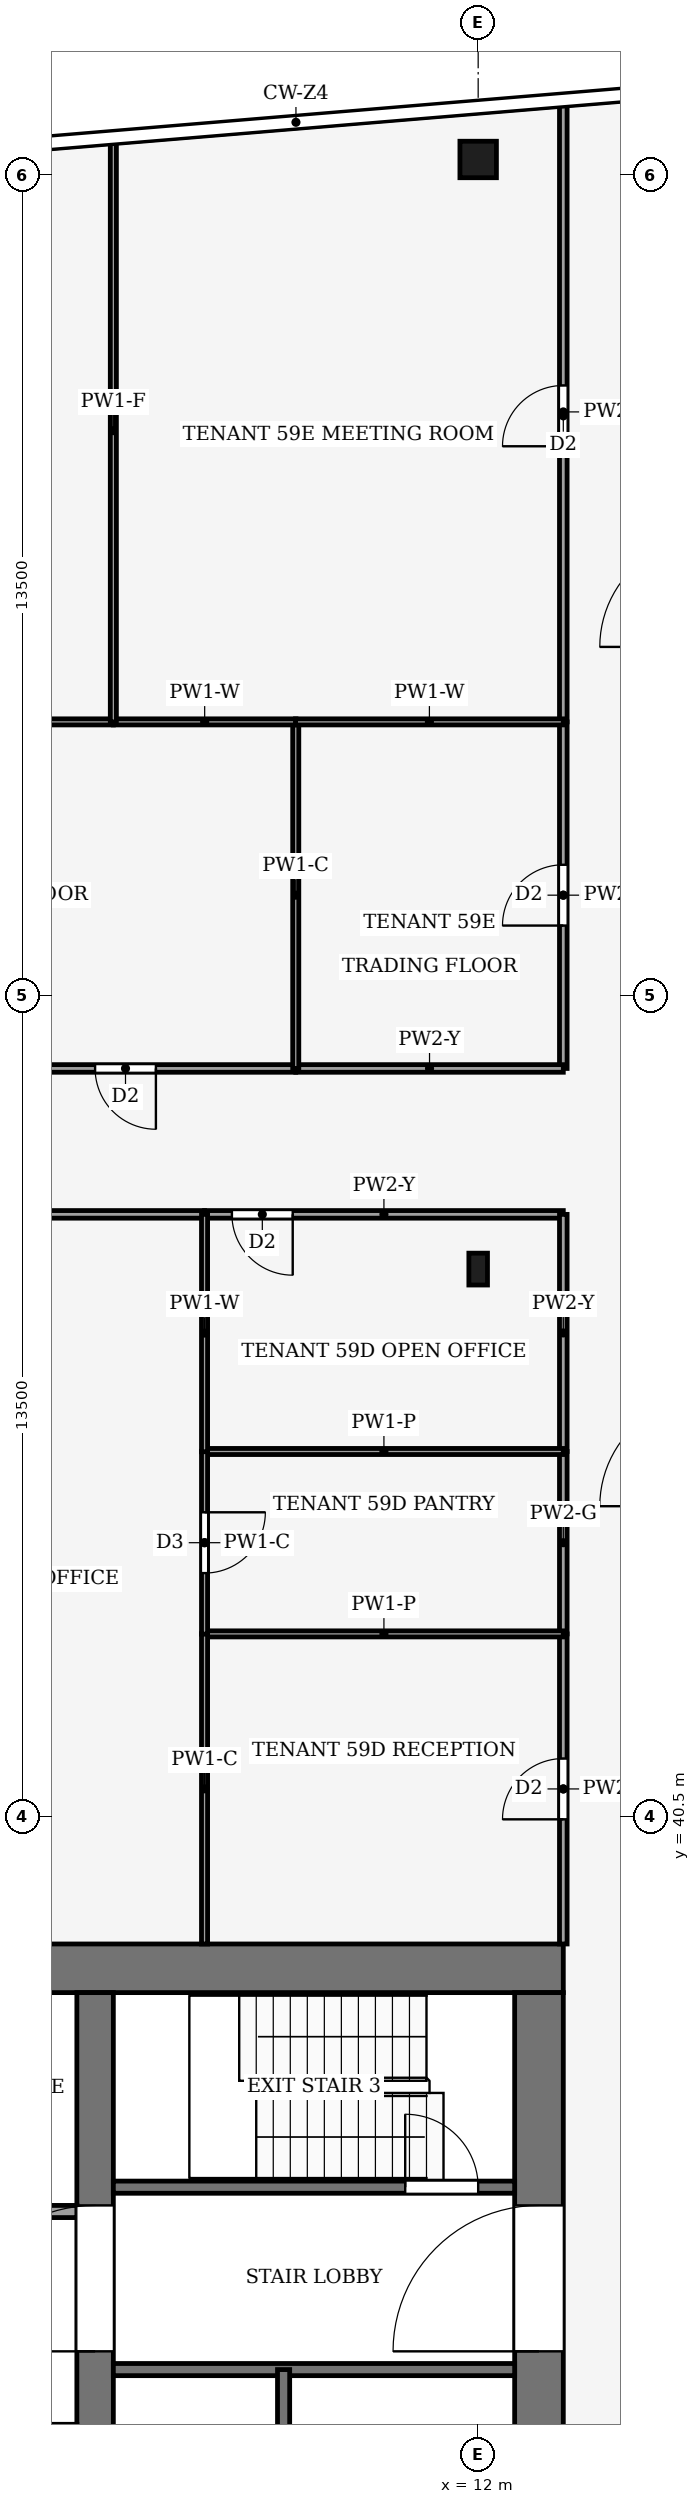
"""IFC4 building model, lengths in metres.
Left out: names, types, materials, properties, quantities, classifications, styles, units other than length and angle.
Written with IfcOpenShell. Run it as: python <this file> out.ifc"""

import sys

from ifc_helpers import new_model, si_unit, direction, frame, frame_2d, origin, origin_2d, place, context, subcontext, project, spatial, rectangle, hollow_rectangle, i_section, extrude, element, fill, save


model = new_model("IFC4")
c1 = context("Model", 3, precision=1e-05, world=origin(), true_north=direction((0.0, 1.0)))
c2 = subcontext(c1, "Body", "Model", "MODEL_VIEW")
j1 = project(units=[si_unit("LENGTHUNIT", "METRE"), si_unit("PLANEANGLEUNIT", "RADIAN")], contexts=[c1])
p1 = place(None, origin())
s1 = spatial("IfcSite", under=j1, at=p1, CompositionType="ELEMENT")
p2 = place(p1, origin())
s2 = spatial("IfcBuilding", under=s1, at=p2, CompositionType="ELEMENT")
p3 = place(p2, frame((0.0, 0.0, 258.0)))
s3 = spatial("IfcBuildingStorey", under=s2, at=p3, CompositionType="ELEMENT", Elevation=258.0)
p4 = place(p3, frame((-13.4, 38.0, -0.13), z_axis=(0.0, 0.0, 1.0), x_axis=(1.0, 0.0, 0.0)))
e1 = element("IfcWall", 1, at=p4, inside=s3, PredefinedType="SHEAR", context=c2, shape_type="SweptSolid", body=[
    extrude(rectangle(XDim=26.8, YDim=0.8, at=frame_2d((13.4, 0.0))), origin(), (0.0, 0.0, 1.0), 4.0),
])
p5 = place(p3, frame((13.0, 18.4, -0.13), z_axis=(0.0, 0.0, 1.0), x_axis=(0.0, 1.0, 0.0)))
e2 = element("IfcWall", 2, at=p5, inside=s3, PredefinedType="SHEAR", context=c2, shape_type="SweptSolid", body=[
    extrude(rectangle(XDim=19.2, YDim=0.8, at=frame_2d((9.6, 0.0))), origin(), (0.0, 0.0, 1.0), 4.0),
])
p6 = place(p5, frame((2.8, 0.0, 0.13)))
e3 = element("IfcOpeningElement", 3, at=p6, cuts=e2, PredefinedType="OPENING", context=c2, shape_type="SweptSolid", body=[
    extrude(rectangle(XDim=2.4, YDim=2.4, at=frame_2d((1.2, 1.2))), frame((0.0, 0.41, 0.0), z_axis=(0.0, -1.0, 0.0), x_axis=(1.0, 0.0, 0.0)), (0.0, 0.0, 1.0), 0.82),
])
p7 = place(p5, frame((13.3, 0.0, 0.13)))
e4 = element("IfcOpeningElement", 4, at=p7, cuts=e2, PredefinedType="OPENING", context=c2, shape_type="SweptSolid", body=[
    extrude(rectangle(XDim=2.4, YDim=2.4, at=frame_2d((1.2, 1.2))), frame((0.0, 0.41, 0.0), z_axis=(0.0, -1.0, 0.0), x_axis=(1.0, 0.0, 0.0)), (0.0, 0.0, 1.0), 0.82),
])
p8 = place(p3, frame((5.7, 18.4, -0.13), z_axis=(0.0, 0.0, 1.0), x_axis=(0.0, 1.0, 0.0)))
e5 = element("IfcWall", 5, at=p8, inside=s3, PredefinedType="SHEAR", context=c2, shape_type="SweptSolid", body=[
    extrude(rectangle(XDim=19.2, YDim=0.6, at=frame_2d((9.6, 0.0))), origin(), (0.0, 0.0, 1.0), 4.0),
])
p9 = place(p8, frame((8.35, 0.0, 0.13)))
e6 = element("IfcOpeningElement", 6, at=p9, cuts=e5, PredefinedType="OPENING", context=c2, shape_type="SweptSolid", body=[
    extrude(rectangle(XDim=0.9, YDim=2.1, at=frame_2d((0.45, 1.05))), frame((0.0, 0.31, 0.0), z_axis=(0.0, -1.0, 0.0), x_axis=(1.0, 0.0, 0.0)), (0.0, 0.0, 1.0), 0.62),
])
p10 = place(p8, frame((13.3, 0.0, 0.13)))
e7 = element("IfcOpeningElement", 7, at=p10, cuts=e5, PredefinedType="OPENING", context=c2, shape_type="SweptSolid", body=[
    extrude(rectangle(XDim=2.4, YDim=2.4, at=frame_2d((1.2, 1.2))), frame((0.0, 0.31, 0.0), z_axis=(0.0, -1.0, 0.0), x_axis=(1.0, 0.0, 0.0)), (0.0, 0.0, 1.0), 0.62),
])
p11 = place(p3, frame((12.0, 67.75, 0.0), z_axis=(0.0, 0.0, 1.0), x_axis=(1.0, 0.0, 0.0)))
e8 = element("IfcColumn", 8, at=p11, inside=s3, PredefinedType="COLUMN", context=c2, shape_type="SweptSolid", body=[
    extrude(hollow_rectangle(XDim=0.6, YDim=0.6, WallThickness=0.025, at=origin_2d()), origin(), (0.0, 0.0, 1.0), 4.0),
])
p12 = place(p3, frame((12.0, 49.5, 0.0), z_axis=(0.0, 0.0, 1.0), x_axis=(1.0, 0.0, 0.0)))
e9 = element("IfcColumn", 9, at=p12, inside=s3, PredefinedType="COLUMN", context=c2, shape_type="SweptSolid", body=[
    extrude(i_section(OverallWidth=0.306, OverallDepth=0.524, WebThickness=0.012, FlangeThickness=0.04, FilletRadius=0.027, at=origin_2d()), origin(), (0.0, 0.0, 1.0), 4.0),
])
p13 = place(p3, frame((6.0, 31.4, 0.0), z_axis=(0.0, 0.0, 1.0), x_axis=(1.0, 0.0, 0.0)))
e10 = element("IfcWall", 10, at=p13, inside=s3, PredefinedType="PARTITIONING", context=c2, shape_type="SweptSolid", body=[
    extrude(rectangle(XDim=6.6, YDim=0.2, at=frame_2d((3.3, 0.0))), origin(), (0.0, 0.0, 1.0), 3.87),
])
p14 = place(p3, frame((-5.4, 34.0, 0.0), z_axis=(0.0, 0.0, 1.0), x_axis=(1.0, 0.0, 0.0)))
e11 = element("IfcWall", 11, at=p14, inside=s3, PredefinedType="PARTITIONING", context=c2, shape_type="SweptSolid", body=[
    extrude(rectangle(XDim=10.8, YDim=0.2, at=frame_2d((5.4, 0.0))), origin(), (0.0, 0.0, 1.0), 3.87),
])
p15 = place(p14, frame((6.15, 0.0, 0.0)))
e12 = element("IfcOpeningElement", 12, at=p15, cuts=e11, PredefinedType="OPENING", context=c2, shape_type="SweptSolid", body=[
    extrude(rectangle(XDim=1.2, YDim=2.2, at=frame_2d((0.6, 1.1))), frame((0.0, 0.11, 0.0), z_axis=(0.0, -1.0, 0.0), x_axis=(1.0, 0.0, 0.0)), (0.0, 0.0, 1.0), 0.22),
])
p16 = place(p14, frame((8.95, 0.0, 0.0)))
e13 = element("IfcOpeningElement", 13, at=p16, cuts=e11, PredefinedType="OPENING", context=c2, shape_type="SweptSolid", body=[
    extrude(rectangle(XDim=1.0, YDim=2.1, at=frame_2d((0.5, 1.05))), frame((0.0, 0.11, 0.0), z_axis=(0.0, -1.0, 0.0), x_axis=(1.0, 0.0, 0.0)), (0.0, 0.0, 1.0), 0.22),
])
p17 = place(p3, frame((6.0, 34.4, 0.0), z_axis=(0.0, 0.0, 1.0), x_axis=(1.0, 0.0, 0.0)))
e14 = element("IfcWall", 14, at=p17, inside=s3, PredefinedType="PARTITIONING", context=c2, shape_type="SweptSolid", body=[
    extrude(rectangle(XDim=6.6, YDim=0.2, at=frame_2d((3.3, 0.0))), origin(), (0.0, 0.0, 1.0), 3.87),
])
p18 = place(p17, frame((4.8, 0.0, 0.0)))
e15 = element("IfcOpeningElement", 15, at=p18, cuts=e14, PredefinedType="OPENING", context=c2, shape_type="SweptSolid", body=[
    extrude(rectangle(XDim=1.2, YDim=2.2, at=frame_2d((0.6, 1.1))), frame((0.0, 0.11, 0.0), z_axis=(0.0, -1.0, 0.0), x_axis=(1.0, 0.0, 0.0)), (0.0, 0.0, 1.0), 0.22),
])
p19 = place(p3, frame((8.8, 24.0, 0.0), z_axis=(0.0, 0.0, 1.0), x_axis=(0.0, 1.0, 0.0)))
e16 = element("IfcWall", 16, at=p19, inside=s3, PredefinedType="PARTITIONING", context=c2, shape_type="SweptSolid", body=[
    extrude(rectangle(XDim=7.4, YDim=0.2, at=frame_2d((3.7, 0.0))), origin(), (0.0, 0.0, 1.0), 3.87),
])
p20 = place(p3, frame((13.4, 38.4, 0.0), z_axis=(0.0, 0.0, 1.0), x_axis=(0.0, 1.0, 0.0)))
e17 = element("IfcWall", 17, at=p20, inside=s3, PredefinedType="PARTITIONING", context=c2, shape_type="SweptSolid", body=[
    extrude(rectangle(XDim=5.1, YDim=0.125, at=frame_2d((2.55, 0.0))), origin(), (0.0, 0.0, 1.0), 3.14),
])
p21 = place(p20, frame((2.05, 0.0, 0.0)))
e18 = element("IfcOpeningElement", 18, at=p21, cuts=e17, PredefinedType="OPENING", context=c2, shape_type="SweptSolid", body=[
    extrude(rectangle(XDim=1.0, YDim=2.1, at=frame_2d((0.5, 1.05))), frame((0.0, 0.073, 0.0), z_axis=(0.0, -1.0, 0.0), x_axis=(1.0, 0.0, 0.0)), (0.0, 0.0, 1.0), 0.145),
])
p22 = place(p3, frame((13.4, 43.5, 0.0), z_axis=(0.0, 0.0, 1.0), x_axis=(0.0, 1.0, 0.0)))
e19 = element("IfcWall", 19, at=p22, inside=s3, PredefinedType="PARTITIONING", context=c2, shape_type="SweptSolid", body=[
    extrude(rectangle(XDim=3.0, YDim=0.125, at=frame_2d((1.5, 0.0))), origin(), (0.0, 0.0, 1.0), 3.87),
])
p23 = place(p3, frame((13.4, 50.4, 0.0), z_axis=(0.0, 0.0, 1.0), x_axis=(-1.0, 0.0, 0.0)))
e20 = element("IfcWall", 20, at=p23, inside=s3, PredefinedType="PARTITIONING", context=c2, shape_type="SweptSolid", body=[
    extrude(rectangle(XDim=5.9, YDim=0.125, at=frame_2d((2.95, 0.0))), origin(), (0.0, 0.0, 1.0), 3.24),
])
p24 = place(p23, frame((4.45, 0.0, 0.0)))
e21 = element("IfcOpeningElement", 21, at=p24, cuts=e20, PredefinedType="OPENING", context=c2, shape_type="SweptSolid", body=[
    extrude(rectangle(XDim=1.0, YDim=2.1, at=frame_2d((0.5, 1.05))), frame((0.0, 0.073, 0.0), z_axis=(0.0, -1.0, 0.0), x_axis=(1.0, 0.0, 0.0)), (0.0, 0.0, 1.0), 0.145),
])
p25 = place(p3, frame((13.4, 46.5, 0.0), z_axis=(0.0, 0.0, 1.0), x_axis=(0.0, 1.0, 0.0)))
e22 = element("IfcWall", 22, at=p25, inside=s3, PredefinedType="PARTITIONING", context=c2, shape_type="SweptSolid", body=[
    extrude(rectangle(XDim=3.9, YDim=0.125, at=frame_2d((1.95, 0.0))), origin(), (0.0, 0.0, 1.0), 3.24),
])
p26 = place(p3, frame((7.5, 50.4, 0.0), z_axis=(0.0, 0.0, 1.0), x_axis=(-1.0, 0.0, 0.0)))
e23 = element("IfcWall", 23, at=p26, inside=s3, PredefinedType="PARTITIONING", context=c2, shape_type="SweptSolid", body=[
    extrude(rectangle(XDim=7.5, YDim=0.125, at=frame_2d((3.75, 0.0))), origin(), (0.0, 0.0, 1.0), 3.24),
])
p27 = place(p26, frame((2.85, 0.0, 0.0)))
e24 = element("IfcOpeningElement", 24, at=p27, cuts=e23, PredefinedType="OPENING", context=c2, shape_type="SweptSolid", body=[
    extrude(rectangle(XDim=1.0, YDim=2.1, at=frame_2d((0.5, 1.05))), frame((0.0, 0.073, 0.0), z_axis=(0.0, -1.0, 0.0), x_axis=(1.0, 0.0, 0.0)), (0.0, 0.0, 1.0), 0.145),
])
p28 = place(p3, frame((9.0, 52.8, 0.0), z_axis=(0.0, 0.0, 1.0), x_axis=(-1.0, 0.0, 0.0)))
e25 = element("IfcWall", 25, at=p28, inside=s3, PredefinedType="PARTITIONING", context=c2, shape_type="SweptSolid", body=[
    extrude(rectangle(XDim=12.0, YDim=0.125, at=frame_2d((6.0, 0.0))), origin(), (0.0, 0.0, 1.0), 3.24),
])
p29 = place(p28, frame((2.3, 0.0, 0.0)))
e26 = element("IfcOpeningElement", 26, at=p29, cuts=e25, PredefinedType="OPENING", context=c2, shape_type="SweptSolid", body=[
    extrude(rectangle(XDim=1.0, YDim=2.1, at=frame_2d((0.5, 1.05))), frame((0.0, 0.073, 0.0), z_axis=(0.0, -1.0, 0.0), x_axis=(1.0, 0.0, 0.0)), (0.0, 0.0, 1.0), 0.145),
])
p30 = place(p3, frame((13.4, 52.8, 0.0), z_axis=(0.0, 0.0, 1.0), x_axis=(0.0, 1.0, 0.0)))
e27 = element("IfcWall", 27, at=p30, inside=s3, PredefinedType="PARTITIONING", context=c2, shape_type="SweptSolid", body=[
    extrude(rectangle(XDim=5.7, YDim=0.125, at=frame_2d((2.85, 0.0))), origin(), (0.0, 0.0, 1.0), 3.87),
])
p31 = place(p30, frame((2.35, 0.0, 0.0)))
e28 = element("IfcOpeningElement", 28, at=p31, cuts=e27, PredefinedType="OPENING", context=c2, shape_type="SweptSolid", body=[
    extrude(rectangle(XDim=1.0, YDim=2.1, at=frame_2d((0.5, 1.05))), frame((0.0, 0.073, 0.0), z_axis=(0.0, -1.0, 0.0), x_axis=(1.0, 0.0, 0.0)), (0.0, 0.0, 1.0), 0.145),
])
p32 = place(p3, frame((13.4, 52.8, 0.0), z_axis=(0.0, 0.0, 1.0), x_axis=(-1.0, 0.0, 0.0)))
e29 = element("IfcWall", 29, at=p32, inside=s3, PredefinedType="PARTITIONING", context=c2, shape_type="SweptSolid", body=[
    extrude(rectangle(XDim=4.4, YDim=0.125, at=frame_2d((2.2, 0.0))), origin(), (0.0, 0.0, 1.0), 3.24),
])
p33 = place(p3, frame((13.4, 58.5, 0.0), z_axis=(0.0, 0.0, 1.0), x_axis=(0.0, 1.0, 0.0)))
e30 = element("IfcWall", 30, at=p33, inside=s3, PredefinedType="PARTITIONING", context=c2, shape_type="SweptSolid", body=[
    extrude(rectangle(XDim=10.197, YDim=0.125, at=frame_2d((5.098, 0.0))), origin(), (0.0, 0.0, 1.0), 3.04),
])
p34 = place(p33, frame((4.533, 0.0, 0.0)))
e31 = element("IfcOpeningElement", 31, at=p34, cuts=e30, PredefinedType="OPENING", context=c2, shape_type="SweptSolid", body=[
    extrude(rectangle(XDim=1.0, YDim=2.1, at=frame_2d((0.5, 1.05))), frame((0.0, 0.073, 0.0), z_axis=(0.0, -1.0, 0.0), x_axis=(1.0, 0.0, 0.0)), (0.0, 0.0, 1.0), 0.145),
])
p35 = place(p3, frame((13.4, 43.5, 0.0), z_axis=(0.0, 0.0, 1.0), x_axis=(-1.0, 0.0, 0.0)))
e32 = element("IfcWall", 32, at=p35, inside=s3, PredefinedType="PARTITIONING", context=c2, shape_type="SweptSolid", body=[
    extrude(rectangle(XDim=5.9, YDim=0.1, at=frame_2d((2.95, 0.0))), origin(), (0.0, 0.0, 1.0), 3.44),
])
p36 = place(p3, frame((7.5, 43.504, 0.0), z_axis=(0.0, 0.0, 1.0), x_axis=(0.0, -1.0, 0.0)))
e33 = element("IfcWall", 33, at=p36, inside=s3, PredefinedType="PARTITIONING", context=c2, shape_type="SweptSolid", body=[
    extrude(rectangle(XDim=5.104, YDim=0.1, at=frame_2d((2.552, 0.0))), origin(), (0.0, 0.0, 1.0), 3.87),
])
p37 = place(p3, frame((13.4, 46.5, 0.0), z_axis=(0.0, 0.0, 1.0), x_axis=(-1.0, 0.0, 0.0)))
e34 = element("IfcWall", 34, at=p37, inside=s3, PredefinedType="PARTITIONING", context=c2, shape_type="SweptSolid", body=[
    extrude(rectangle(XDim=5.9, YDim=0.1, at=frame_2d((2.95, 0.0))), origin(), (0.0, 0.0, 1.0), 3.44),
])
p38 = place(p3, frame((7.5, 46.504, 0.0), z_axis=(0.0, 0.0, 1.0), x_axis=(0.0, -1.0, 0.0)))
e35 = element("IfcWall", 35, at=p38, inside=s3, PredefinedType="PARTITIONING", context=c2, shape_type="SweptSolid", body=[
    extrude(rectangle(XDim=3.008, YDim=0.1, at=frame_2d((1.504, 0.0))), origin(), (0.0, 0.0, 1.0), 3.87),
])
p39 = place(p38, frame((1.004, 0.0, 0.0)))
e36 = element("IfcOpeningElement", 36, at=p39, cuts=e35, PredefinedType="OPENING", context=c2, shape_type="SweptSolid", body=[
    extrude(rectangle(XDim=1.0, YDim=2.1, at=frame_2d((0.5, 1.05))), frame((0.0, 0.06, 0.0), z_axis=(0.0, -1.0, 0.0), x_axis=(1.0, 0.0, 0.0)), (0.0, 0.0, 1.0), 0.12),
])
p40 = place(p3, frame((7.5, 50.4, 0.0), z_axis=(0.0, 0.0, 1.0), x_axis=(0.0, -1.0, 0.0)))
e37 = element("IfcWall", 37, at=p40, inside=s3, PredefinedType="PARTITIONING", context=c2, shape_type="SweptSolid", body=[
    extrude(rectangle(XDim=3.904, YDim=0.1, at=frame_2d((1.952, 0.0))), origin(), (0.0, 0.0, 1.0), 3.24),
])
p41 = place(p3, frame((9.0, 52.8, 0.0), z_axis=(0.0, 0.0, 1.0), x_axis=(0.0, 1.0, 0.0)))
e38 = element("IfcWall", 38, at=p41, inside=s3, PredefinedType="PARTITIONING", context=c2, shape_type="SweptSolid", body=[
    extrude(rectangle(XDim=5.7, YDim=0.1, at=frame_2d((2.85, 0.0))), origin(), (0.0, 0.0, 1.0), 3.87),
])
p42 = place(p3, frame((-3.0, 58.5, 0.0), z_axis=(0.0, 0.0, 1.0), x_axis=(1.0, 0.0, 0.0)))
e39 = element("IfcWall", 39, at=p42, inside=s3, PredefinedType="PARTITIONING", context=c2, shape_type="SweptSolid", body=[
    extrude(rectangle(XDim=9.0, YDim=0.1, at=frame_2d((4.5, 0.0))), origin(), (0.0, 0.0, 1.0), 3.24),
])
p43 = place(p42, frame((4.0, 0.0, 0.0)))
e40 = element("IfcOpeningElement", 40, at=p43, cuts=e39, PredefinedType="OPENING", context=c2, shape_type="SweptSolid", body=[
    extrude(rectangle(XDim=1.0, YDim=2.1, at=frame_2d((0.5, 1.05))), frame((0.0, 0.06, 0.0), z_axis=(0.0, -1.0, 0.0), x_axis=(1.0, 0.0, 0.0)), (0.0, 0.0, 1.0), 0.12),
])
p44 = place(p3, frame((9.004, 58.5, 0.0), z_axis=(0.0, 0.0, 1.0), x_axis=(-1.0, 0.0, 0.0)))
e41 = element("IfcWall", 41, at=p44, inside=s3, PredefinedType="PARTITIONING", context=c2, shape_type="SweptSolid", body=[
    extrude(rectangle(XDim=3.004, YDim=0.1, at=frame_2d((1.502, 0.0))), origin(), (0.0, 0.0, 1.0), 3.24),
])
p45 = place(p3, frame((13.4, 58.5, 0.0), z_axis=(0.0, 0.0, 1.0), x_axis=(-1.0, 0.0, 0.0)))
e42 = element("IfcWall", 42, at=p45, inside=s3, PredefinedType="PARTITIONING", context=c2, shape_type="SweptSolid", body=[
    extrude(rectangle(XDim=4.404, YDim=0.1, at=frame_2d((2.202, 0.0))), origin(), (0.0, 0.0, 1.0), 3.24),
])
p46 = place(p3, frame((6.0, 58.5, 0.0), z_axis=(0.0, 0.0, 1.0), x_axis=(0.0, 1.0, 0.0)))
e43 = element("IfcWall", 43, at=p46, inside=s3, PredefinedType="PARTITIONING", context=c2, shape_type="SweptSolid", body=[
    extrude(rectangle(XDim=9.58, YDim=0.1, at=frame_2d((4.79, 0.0))), origin(), (0.0, 0.0, 1.0), 3.04),
])
p47 = place(p18, origin())
e44 = element("IfcDoor", 44, at=p47, inside=s3, OperationType="SINGLE_SWING_RIGHT", PredefinedType="DOOR", context=c2, shape_type="SweptSolid", body=[
    extrude(rectangle(XDim=1.2, YDim=2.2, at=frame_2d((0.6, 1.1))), frame((0.0, 0.025, 0.0), z_axis=(0.0, -1.0, 0.0), x_axis=(1.0, 0.0, 0.0)), (0.0, 0.0, 1.0), 0.05),
])
fill(e15, e44)
p48 = place(p10, origin())
e45 = element("IfcDoor", 45, at=p48, inside=s3, OperationType="DOUBLE_DOOR_SINGLE_SWING", PredefinedType="DOOR", context=c2, shape_type="SweptSolid", body=[
    extrude(rectangle(XDim=2.4, YDim=2.4, at=frame_2d((1.2, 1.2))), frame((0.0, 0.025, 0.0), z_axis=(0.0, -1.0, 0.0), x_axis=(1.0, 0.0, 0.0)), (0.0, 0.0, 1.0), 0.05),
])
fill(e7, e45)
p49 = place(p7, origin())
e46 = element("IfcDoor", 46, at=p49, inside=s3, OperationType="DOUBLE_DOOR_SINGLE_SWING", PredefinedType="DOOR", context=c2, shape_type="SweptSolid", body=[
    extrude(rectangle(XDim=2.4, YDim=2.4, at=frame_2d((1.2, 1.2))), frame((0.0, 0.025, 0.0), z_axis=(0.0, -1.0, 0.0), x_axis=(1.0, 0.0, 0.0)), (0.0, 0.0, 1.0), 0.05),
])
fill(e4, e46)
p50 = place(p21, origin())
e47 = element("IfcDoor", 47, at=p50, inside=s3, OperationType="SINGLE_SWING_LEFT", PredefinedType="DOOR", context=c2, shape_type="SweptSolid", body=[
    extrude(rectangle(XDim=1.0, YDim=2.1, at=frame_2d((0.5, 1.05))), frame((0.0, 0.025, 0.0), z_axis=(0.0, -1.0, 0.0), x_axis=(1.0, 0.0, 0.0)), (0.0, 0.0, 1.0), 0.05),
])
fill(e18, e47)
p51 = place(p24, origin())
e48 = element("IfcDoor", 48, at=p51, inside=s3, OperationType="SINGLE_SWING_RIGHT", PredefinedType="DOOR", context=c2, shape_type="SweptSolid", body=[
    extrude(rectangle(XDim=1.0, YDim=2.1, at=frame_2d((0.5, 1.05))), frame((0.0, 0.025, 0.0), z_axis=(0.0, -1.0, 0.0), x_axis=(1.0, 0.0, 0.0)), (0.0, 0.0, 1.0), 0.05),
])
fill(e21, e48)
p52 = place(p29, origin())
e49 = element("IfcDoor", 49, at=p52, inside=s3, OperationType="SINGLE_SWING_LEFT", PredefinedType="DOOR", context=c2, shape_type="SweptSolid", body=[
    extrude(rectangle(XDim=1.0, YDim=2.1, at=frame_2d((0.5, 1.05))), frame((0.0, 0.025, 0.0), z_axis=(0.0, -1.0, 0.0), x_axis=(1.0, 0.0, 0.0)), (0.0, 0.0, 1.0), 0.05),
])
fill(e26, e49)
p53 = place(p31, origin())
e50 = element("IfcDoor", 50, at=p53, inside=s3, OperationType="SINGLE_SWING_RIGHT", PredefinedType="DOOR", context=c2, shape_type="SweptSolid", body=[
    extrude(rectangle(XDim=1.0, YDim=2.1, at=frame_2d((0.5, 1.05))), frame((0.0, 0.025, 0.0), z_axis=(0.0, -1.0, 0.0), x_axis=(1.0, 0.0, 0.0)), (0.0, 0.0, 1.0), 0.05),
])
fill(e28, e50)
p54 = place(p34, origin())
e51 = element("IfcDoor", 51, at=p54, inside=s3, OperationType="SINGLE_SWING_LEFT", PredefinedType="DOOR", context=c2, shape_type="SweptSolid", body=[
    extrude(rectangle(XDim=1.0, YDim=2.1, at=frame_2d((0.5, 1.05))), frame((0.0, 0.025, 0.0), z_axis=(0.0, -1.0, 0.0), x_axis=(1.0, 0.0, 0.0)), (0.0, 0.0, 1.0), 0.05),
])
fill(e31, e51)
p55 = place(p39, origin())
e52 = element("IfcDoor", 52, at=p55, inside=s3, OperationType="SINGLE_SWING_LEFT", PredefinedType="DOOR", context=c2, shape_type="SweptSolid", body=[
    extrude(rectangle(XDim=1.0, YDim=2.1, at=frame_2d((0.5, 1.05))), frame((0.0, 0.025, 0.0), z_axis=(0.0, -1.0, 0.0), x_axis=(1.0, 0.0, 0.0)), (0.0, 0.0, 1.0), 0.05),
])
fill(e36, e52)
save(model, sys.argv[1])
